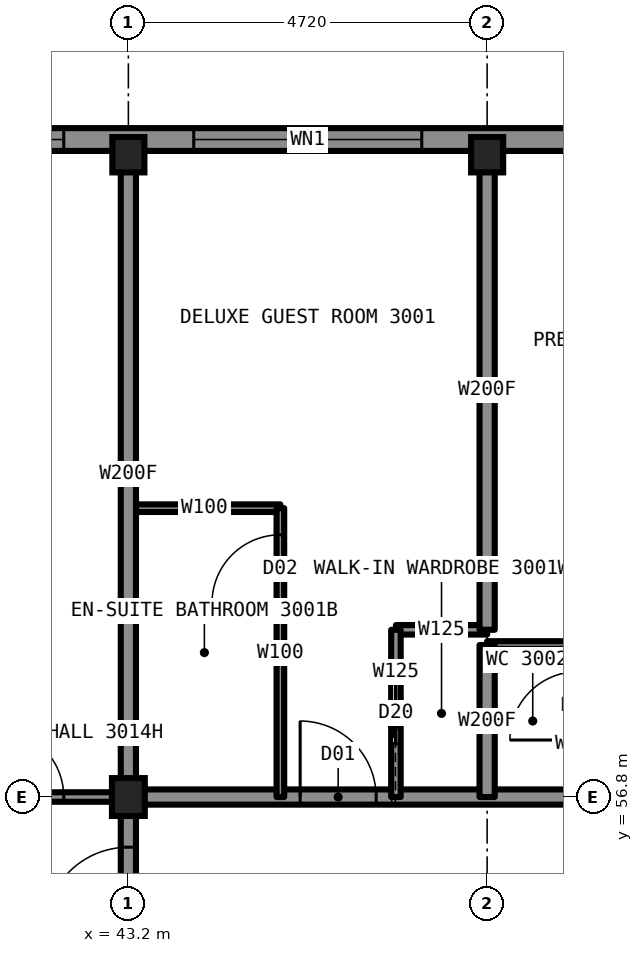
"""IFC4 building model, lengths in metres.
Left out: names, types, materials, properties, quantities, classifications, styles, units other than length and angle.
Written with IfcOpenShell. Run it as: python <this file> out.ifc"""

import sys

from ifc_helpers import new_model, si_unit, direction, frame, frame_2d, origin, origin_2d, place, context, subcontext, project, spatial, rectangle, i_section, extrude, element, fill, save


model = new_model("IFC4")
c1 = context("Model", 3, precision=1e-05, world=origin(), true_north=direction((0.0, 1.0)))
c2 = subcontext(c1, "Body", "Model", "MODEL_VIEW")
j1 = project(units=[si_unit("LENGTHUNIT", "METRE"), si_unit("PLANEANGLEUNIT", "RADIAN")], contexts=[c1])
p1 = place(None, origin())
s1 = spatial("IfcSite", under=j1, at=p1, CompositionType="ELEMENT")
p2 = place(p1, origin())
s2 = spatial("IfcBuilding", under=s1, at=p2, CompositionType="ELEMENT")
p3 = place(p2, frame((0.0, 0.0, 114.4)))
s3 = spatial("IfcBuildingStorey", under=s2, at=p3, CompositionType="ELEMENT", Elevation=114.4)
for number, where, z_axis, x_axis in (
    (1, (43.2, 65.25, 0.0), (0.0, 0.0, 1.0), (1.0, 0.0, 0.0)),
    (2, (47.92, 65.25, 0.0), (0.0, 0.0, 1.0), (1.0, 0.0, 0.0)),
):
    element("IfcColumn", number, at=place(p3, frame(where, z_axis=z_axis, x_axis=x_axis)), inside=s3, PredefinedType="COLUMN", context=c2, shape_type="SweptSolid", body=[
        extrude(i_section(OverallWidth=0.422, OverallDepth=0.465, WebThickness=0.045, FlangeThickness=0.073, at=origin_2d()), origin(), (0.0, 0.0, 1.0), 3.5),
    ])
p4 = place(p3, frame((43.2, 56.8, 0.0), z_axis=(0.0, 0.0, 1.0), x_axis=(1.0, 0.0, 0.0)))
e3 = element("IfcColumn", 3, at=p4, inside=s3, PredefinedType="COLUMN", context=c2, shape_type="SweptSolid", body=[
    extrude(i_section(OverallWidth=0.432, OverallDepth=0.498, WebThickness=0.056, FlangeThickness=0.089, at=origin_2d()), origin(), (0.0, 0.0, 1.0), 3.5),
])
p5 = place(p3, frame((43.2, 56.8, 0.0), z_axis=(0.0, 0.0, 1.0), x_axis=(1.0, 0.0, 0.0)))
e4 = element("IfcWall", 4, at=p5, inside=s3, PredefinedType="PARTITIONING", context=c2, shape_type="SweptSolid", body=[
    extrude(rectangle(XDim=23.6, YDim=0.2, at=frame_2d((11.8, 0.0))), origin(), (0.0, 0.0, 1.0), 3.33),
])
p6 = place(p5, frame((2.26, 0.0, 0.0)))
e5 = element("IfcOpeningElement", 5, at=p6, cuts=e4, PredefinedType="OPENING", context=c2, shape_type="SweptSolid", body=[
    extrude(rectangle(XDim=1.0, YDim=2.2, at=frame_2d((0.5, 1.1))), frame((0.0, 0.11, 0.0), z_axis=(0.0, -1.0, 0.0), x_axis=(1.0, 0.0, 0.0)), (0.0, 0.0, 1.0), 0.22),
])
p7 = place(p5, frame((6.18, 0.0, 0.0)))
e6 = element("IfcOpeningElement", 6, at=p7, cuts=e4, PredefinedType="OPENING", context=c2, shape_type="SweptSolid", body=[
    extrude(rectangle(XDim=1.0, YDim=2.2, at=frame_2d((0.5, 1.1))), frame((0.0, 0.11, 0.0), z_axis=(0.0, -1.0, 0.0), x_axis=(1.0, 0.0, 0.0)), (0.0, 0.0, 1.0), 0.22),
])
p8 = place(p5, frame((11.99, 0.0, 0.0)))
e7 = element("IfcOpeningElement", 7, at=p8, cuts=e4, PredefinedType="OPENING", context=c2, shape_type="SweptSolid", body=[
    extrude(rectangle(XDim=1.0, YDim=2.2, at=frame_2d((0.5, 1.1))), frame((0.0, 0.11, 0.0), z_axis=(0.0, -1.0, 0.0), x_axis=(1.0, 0.0, 0.0)), (0.0, 0.0, 1.0), 0.22),
])
p9 = place(p5, frame((17.16, 0.0, 0.0)))
e8 = element("IfcOpeningElement", 8, at=p9, cuts=e4, PredefinedType="OPENING", context=c2, shape_type="SweptSolid", body=[
    extrude(rectangle(XDim=1.0, YDim=2.2, at=frame_2d((0.5, 1.1))), frame((0.0, 0.11, 0.0), z_axis=(0.0, -1.0, 0.0), x_axis=(1.0, 0.0, 0.0)), (0.0, 0.0, 1.0), 0.22),
])
p10 = place(p3, frame((34.7, 56.8, 0.0), z_axis=(0.0, 0.0, 1.0), x_axis=(1.0, 0.0, 0.0)))
e9 = element("IfcWall", 9, at=p10, inside=s3, PredefinedType="PARTITIONING", context=c2, shape_type="SweptSolid", body=[
    extrude(rectangle(XDim=8.5, YDim=0.125, at=frame_2d((4.25, 0.0))), origin(), (0.0, 0.0, 1.0), 2.573),
])
p11 = place(p10, frame((6.75, 0.0, 0.0)))
e10 = element("IfcOpeningElement", 10, at=p11, cuts=e9, PredefinedType="OPENING", context=c2, shape_type="SweptSolid", body=[
    extrude(rectangle(XDim=0.9, YDim=2.2, at=frame_2d((0.45, 1.1))), frame((0.0, 0.073, 0.0), z_axis=(0.0, -1.0, 0.0), x_axis=(1.0, 0.0, 0.0)), (0.0, 0.0, 1.0), 0.145),
])
p12 = place(p3, frame((47.92, 58.8, 0.0), z_axis=(0.0, 0.0, 1.0), x_axis=(1.0, 0.0, 0.0)))
e11 = element("IfcWall", 11, at=p12, inside=s3, PredefinedType="PARTITIONING", context=c2, shape_type="SweptSolid", body=[
    extrude(rectangle(XDim=1.2, YDim=0.1, at=frame_2d((0.6, 0.0))), origin(), (0.0, 0.0, 1.0), 3.33),
])
p13 = place(p3, frame((46.72, 59.0, 0.0), z_axis=(0.0, 0.0, 1.0), x_axis=(1.0, 0.0, 0.0)))
e12 = element("IfcWall", 12, at=p13, inside=s3, PredefinedType="PARTITIONING", context=c2, shape_type="SweptSolid", body=[
    extrude(rectangle(XDim=1.2, YDim=0.125, at=frame_2d((0.6, 0.0))), origin(), (0.0, 0.0, 1.0), 3.33),
])
p14 = place(p3, frame((43.2, 60.6, 0.0), z_axis=(0.0, 0.0, 1.0), x_axis=(1.0, 0.0, 0.0)))
e13 = element("IfcWall", 13, at=p14, inside=s3, PredefinedType="PARTITIONING", context=c2, shape_type="SweptSolid", body=[
    extrude(rectangle(XDim=2.0, YDim=0.1, at=frame_2d((1.0, 0.0))), origin(), (0.0, 0.0, 1.0), 3.33),
])
p15 = place(p3, frame((43.2, 52.08, 0.0), z_axis=(0.0, 0.0, 1.0), x_axis=(0.0, 1.0, 0.0)))
e14 = element("IfcWall", 14, at=p15, inside=s3, PredefinedType="PARTITIONING", context=c2, shape_type="SweptSolid", body=[
    extrude(rectangle(XDim=4.72, YDim=0.2, at=frame_2d((2.36, 0.0))), origin(), (0.0, 0.0, 1.0), 3.33),
])
p16 = place(p15, frame((2.96, 0.0, 0.0)))
e15 = element("IfcOpeningElement", 15, at=p16, cuts=e14, PredefinedType="OPENING", context=c2, shape_type="SweptSolid", body=[
    extrude(rectangle(XDim=1.1, YDim=2.2, at=frame_2d((0.55, 1.1))), frame((0.0, 0.11, 0.0), z_axis=(0.0, -1.0, 0.0), x_axis=(1.0, 0.0, 0.0)), (0.0, 0.0, 1.0), 0.22),
])
p17 = place(p3, frame((43.2, 56.8, 0.0), z_axis=(0.0, 0.0, 1.0), x_axis=(0.0, 1.0, 0.0)))
e16 = element("IfcWall", 16, at=p17, inside=s3, PredefinedType="PARTITIONING", context=c2, shape_type="SweptSolid", body=[
    extrude(rectangle(XDim=8.5, YDim=0.2, at=frame_2d((4.25, 0.0))), origin(), (0.0, 0.0, 1.0), 2.573),
])
p18 = place(p3, frame((47.92, 56.8, 0.0), z_axis=(0.0, 0.0, 1.0), x_axis=(0.0, 1.0, 0.0)))
e17 = element("IfcWall", 17, at=p18, inside=s3, PredefinedType="PARTITIONING", context=c2, shape_type="SweptSolid", body=[
    extrude(rectangle(XDim=2.0, YDim=0.2, at=frame_2d((1.0, 0.0))), origin(), (0.0, 0.0, 1.0), 2.573),
])
p19 = place(p3, frame((47.92, 59.0, 0.0), z_axis=(0.0, 0.0, 1.0), x_axis=(0.0, 1.0, 0.0)))
e18 = element("IfcWall", 18, at=p19, inside=s3, PredefinedType="PARTITIONING", context=c2, shape_type="SweptSolid", body=[
    extrude(rectangle(XDim=6.3, YDim=0.2, at=frame_2d((3.15, 0.0))), origin(), (0.0, 0.0, 1.0), 2.573),
])
p20 = place(p3, frame((46.72, 56.8, 0.0), z_axis=(0.0, 0.0, 1.0), x_axis=(0.0, 1.0, 0.0)))
e19 = element("IfcWall", 19, at=p20, inside=s3, PredefinedType="PARTITIONING", context=c2, shape_type="SweptSolid", body=[
    extrude(rectangle(XDim=2.2, YDim=0.125, at=frame_2d((1.1, 0.0))), origin(), (0.0, 0.0, 1.0), 3.33),
])
p21 = place(p20, frame((0.7, 0.0, 0.0)))
e20 = element("IfcOpeningElement", 20, at=p21, cuts=e19, PredefinedType="OPENING", context=c2, shape_type="SweptSolid", body=[
    extrude(rectangle(XDim=0.8, YDim=2.1, at=frame_2d((0.4, 1.05))), frame((0.0, 0.073, 0.0), z_axis=(0.0, -1.0, 0.0), x_axis=(1.0, 0.0, 0.0)), (0.0, 0.0, 1.0), 0.145),
])
p22 = place(p3, frame((45.2, 56.8, 0.0), z_axis=(0.0, 0.0, 1.0), x_axis=(0.0, 1.0, 0.0)))
e21 = element("IfcWall", 21, at=p22, inside=s3, PredefinedType="PARTITIONING", context=c2, shape_type="SweptSolid", body=[
    extrude(rectangle(XDim=3.8, YDim=0.1, at=frame_2d((1.9, 0.0))), origin(), (0.0, 0.0, 1.0), 3.33),
])
p23 = place(p22, frame((2.55, 0.0, 0.0)))
e22 = element("IfcOpeningElement", 22, at=p23, cuts=e21, PredefinedType="OPENING", context=c2, shape_type="SweptSolid", body=[
    extrude(rectangle(XDim=0.9, YDim=2.1, at=frame_2d((0.45, 1.05))), frame((0.0, 0.06, 0.0), z_axis=(0.0, -1.0, 0.0), x_axis=(1.0, 0.0, 0.0)), (0.0, 0.0, 1.0), 0.12),
])
p24 = place(p3, frame((70.1, 65.45, 0.0), z_axis=(0.0, 0.0, 1.0), x_axis=(-1.0, 0.0, 0.0)))
e23 = element("IfcWall", 23, at=p24, inside=s3, PredefinedType="SOLIDWALL", context=c2, shape_type="SweptSolid", body=[
    extrude(rectangle(XDim=30.2, YDim=0.3, at=frame_2d((15.1, 0.0))), origin(), (0.0, 0.0, 1.0), 2.83),
])
p25 = place(p24, frame((0.85, 0.0, 0.5)))
e24 = element("IfcOpeningElement", 24, at=p25, cuts=e23, PredefinedType="OPENING", context=c2, shape_type="SweptSolid", body=[
    extrude(rectangle(XDim=1.6, YDim=2.0, at=frame_2d((0.8, 1.0))), frame((0.0, 0.16, 0.0), z_axis=(0.0, -1.0, 0.0), x_axis=(1.0, 0.0, 0.0)), (0.0, 0.0, 1.0), 0.32),
])
p26 = place(p24, frame((4.16, 0.0, 0.5)))
e25 = element("IfcOpeningElement", 25, at=p26, cuts=e23, PredefinedType="OPENING", context=c2, shape_type="SweptSolid", body=[
    extrude(rectangle(XDim=3.0, YDim=2.0, at=frame_2d((1.5, 1.0))), frame((0.0, 0.16, 0.0), z_axis=(0.0, -1.0, 0.0), x_axis=(1.0, 0.0, 0.0)), (0.0, 0.0, 1.0), 0.32),
])
p27 = place(p24, frame((10.53, 0.0, 0.5)))
e26 = element("IfcOpeningElement", 26, at=p27, cuts=e23, PredefinedType="OPENING", context=c2, shape_type="SweptSolid", body=[
    extrude(rectangle(XDim=1.3, YDim=1.9, at=frame_2d((0.65, 0.95))), frame((0.0, 0.16, 0.0), z_axis=(0.0, -1.0, 0.0), x_axis=(1.0, 0.0, 0.0)), (0.0, 0.0, 1.0), 0.32),
])
p28 = place(p24, frame((13.6, 0.0, 0.5)))
e27 = element("IfcOpeningElement", 27, at=p28, cuts=e23, PredefinedType="OPENING", context=c2, shape_type="SweptSolid", body=[
    extrude(rectangle(XDim=3.0, YDim=2.0, at=frame_2d((1.5, 1.0))), frame((0.0, 0.16, 0.0), z_axis=(0.0, -1.0, 0.0), x_axis=(1.0, 0.0, 0.0)), (0.0, 0.0, 1.0), 0.32),
])
p29 = place(p24, frame((18.32, 0.0, 0.5)))
e28 = element("IfcOpeningElement", 28, at=p29, cuts=e23, PredefinedType="OPENING", context=c2, shape_type="SweptSolid", body=[
    extrude(rectangle(XDim=1.3, YDim=1.9, at=frame_2d((0.65, 0.95))), frame((0.0, 0.16, 0.0), z_axis=(0.0, -1.0, 0.0), x_axis=(1.0, 0.0, 0.0)), (0.0, 0.0, 1.0), 0.32),
])
p30 = place(p24, frame((23.04, 0.0, 0.5)))
e29 = element("IfcOpeningElement", 29, at=p30, cuts=e23, PredefinedType="OPENING", context=c2, shape_type="SweptSolid", body=[
    extrude(rectangle(XDim=3.0, YDim=2.0, at=frame_2d((1.5, 1.0))), frame((0.0, 0.16, 0.0), z_axis=(0.0, -1.0, 0.0), x_axis=(1.0, 0.0, 0.0)), (0.0, 0.0, 1.0), 0.32),
])
p31 = place(p24, frame((27.75, 0.0, 0.5)))
e30 = element("IfcOpeningElement", 30, at=p31, cuts=e23, PredefinedType="OPENING", context=c2, shape_type="SweptSolid", body=[
    extrude(rectangle(XDim=1.6, YDim=2.0, at=frame_2d((0.8, 1.0))), frame((0.0, 0.16, 0.0), z_axis=(0.0, -1.0, 0.0), x_axis=(1.0, 0.0, 0.0)), (0.0, 0.0, 1.0), 0.32),
])
p32 = place(p24, frame((9.88, 0.0, 0.5)))
e31 = element("IfcOpeningElement", 31, at=p32, cuts=e23, PredefinedType="OPENING", context=c2, shape_type="SweptSolid", body=[
    extrude(rectangle(XDim=0.6, YDim=0.9, at=frame_2d((0.3, 0.45))), frame((0.0, 0.16, 0.0), z_axis=(0.0, -1.0, 0.0), x_axis=(1.0, 0.0, 0.0)), (0.0, 0.0, 1.0), 0.32),
])
p33 = place(p24, frame((19.67, 0.0, 0.5)))
e32 = element("IfcOpeningElement", 32, at=p33, cuts=e23, PredefinedType="OPENING", context=c2, shape_type="SweptSolid", body=[
    extrude(rectangle(XDim=0.6, YDim=0.9, at=frame_2d((0.3, 0.45))), frame((0.0, 0.16, 0.0), z_axis=(0.0, -1.0, 0.0), x_axis=(1.0, 0.0, 0.0)), (0.0, 0.0, 1.0), 0.32),
])
p34 = place(p6, origin())
e33 = element("IfcDoor", 33, at=p34, inside=s3, OperationType="SINGLE_SWING_LEFT", PredefinedType="DOOR", context=c2, shape_type="SweptSolid", body=[
    extrude(rectangle(XDim=1.0, YDim=2.2, at=frame_2d((0.5, 1.1))), frame((0.0, 0.025, 0.0), z_axis=(0.0, -1.0, 0.0), x_axis=(1.0, 0.0, 0.0)), (0.0, 0.0, 1.0), 0.05),
])
fill(e5, e33)
p35 = place(p23, origin())
e34 = element("IfcDoor", 34, at=p35, inside=s3, OperationType="SINGLE_SWING_RIGHT", PredefinedType="DOOR", context=c2, shape_type="SweptSolid", body=[
    extrude(rectangle(XDim=0.9, YDim=2.1, at=frame_2d((0.45, 1.05))), frame((0.0, 0.025, 0.0), z_axis=(0.0, -1.0, 0.0), x_axis=(1.0, 0.0, 0.0)), (0.0, 0.0, 1.0), 0.05),
])
fill(e22, e34)
p36 = place(p21, origin())
e35 = element("IfcDoor", 35, at=p36, inside=s3, OperationType="SLIDING_TO_LEFT", PredefinedType="DOOR", context=c2, shape_type="SweptSolid", body=[
    extrude(rectangle(XDim=0.8, YDim=2.1, at=frame_2d((0.4, 1.05))), frame((0.0, 0.025, 0.0), z_axis=(0.0, -1.0, 0.0), x_axis=(1.0, 0.0, 0.0)), (0.0, 0.0, 1.0), 0.05),
])
fill(e20, e35)
p37 = place(p11, origin())
e36 = element("IfcDoor", 36, at=p37, inside=s3, OperationType="SINGLE_SWING_LEFT", PredefinedType="DOOR", context=c2, shape_type="SweptSolid", body=[
    extrude(rectangle(XDim=0.9, YDim=2.2, at=frame_2d((0.45, 1.1))), frame((0.0, 0.025, 0.0), z_axis=(0.0, -1.0, 0.0), x_axis=(1.0, 0.0, 0.0)), (0.0, 0.0, 1.0), 0.05),
])
fill(e10, e36)
p38 = place(p16, origin())
e37 = element("IfcDoor", 37, at=p38, inside=s3, OperationType="SINGLE_SWING_LEFT", PredefinedType="DOOR", context=c2, shape_type="SweptSolid", body=[
    extrude(rectangle(XDim=1.1, YDim=2.2, at=frame_2d((0.55, 1.1))), frame((0.0, 0.025, 0.0), z_axis=(0.0, -1.0, 0.0), x_axis=(1.0, 0.0, 0.0)), (0.0, 0.0, 1.0), 0.05),
])
fill(e15, e37)
p39 = place(p30, origin())
e38 = element("IfcWindow", 38, at=p39, inside=s3, PartitioningType="SINGLE_PANEL", PredefinedType="WINDOW", context=c2, shape_type="SweptSolid", body=[
    extrude(rectangle(XDim=3.0, YDim=2.0, at=frame_2d((1.5, 1.0))), frame((0.0, 0.03, 0.0), z_axis=(0.0, -1.0, 0.0), x_axis=(1.0, 0.0, 0.0)), (0.0, 0.0, 1.0), 0.06),
])
fill(e29, e38)
p40 = place(p31, origin())
e39 = element("IfcWindow", 39, at=p40, inside=s3, PartitioningType="SINGLE_PANEL", PredefinedType="WINDOW", context=c2, shape_type="SweptSolid", body=[
    extrude(rectangle(XDim=1.6, YDim=2.0, at=frame_2d((0.8, 1.0))), frame((0.0, 0.03, 0.0), z_axis=(0.0, -1.0, 0.0), x_axis=(1.0, 0.0, 0.0)), (0.0, 0.0, 1.0), 0.06),
])
fill(e30, e39)
save(model, sys.argv[1])
